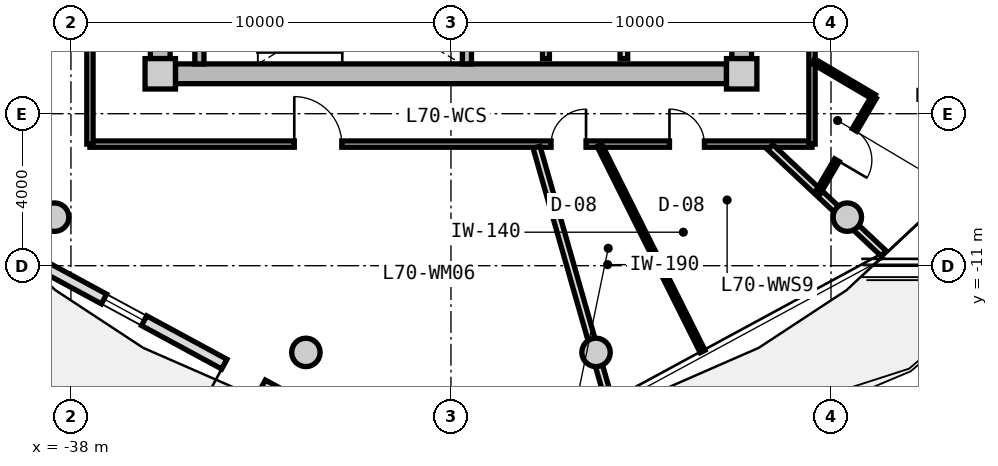
"""IFC4 building model, lengths in metres.
Left out: names, types, materials, properties, quantities, classifications, styles, units other than length and angle.
Written with IfcOpenShell. Run it as: python <this file> out.ifc"""

import sys

from ifc_helpers import new_model, si_unit, direction, frame, frame_2d, origin, origin_2d, place, context, subcontext, project, spatial, rectangle, circle, extrude, source, transform, mapped, element, fill, save


model = new_model("IFC4")
c1 = context("Model", 3, precision=1e-05, world=origin(), true_north=direction((0.0, 1.0)))
c2 = subcontext(c1, "Body", "Model", "MODEL_VIEW")
j1 = project(units=[si_unit("LENGTHUNIT", "METRE"), si_unit("PLANEANGLEUNIT", "RADIAN")], contexts=[c1])
p1 = place(None, origin())
s1 = spatial("IfcSite", under=j1, at=p1, CompositionType="ELEMENT")
p2 = place(p1, origin())
s2 = spatial("IfcBuilding", under=s1, at=p2, CompositionType="ELEMENT")
p3 = place(p2, frame((0.0, 0.0, 226.1)))
s3 = spatial("IfcBuildingStorey", under=s2, at=p3, CompositionType="ELEMENT", Elevation=226.1)
m1 = source(origin(), c2, "Body", "SweptSolid", [
    extrude(rectangle(XDim=0.8, YDim=0.8, at=origin_2d()), origin(), (0.0, 0.0, 1.0), 3.05),
])
for number, where, z_axis, x_axis in (
    (1, (-35.65, -5.95, 0.0), (0.0, 0.0, 1.0), (1.0, 0.0, 0.0)),
    (2, (-20.35, -5.95, 0.0), (0.0, 0.0, 1.0), (1.0, 0.0, 0.0)),
):
    element("IfcColumn", number, at=place(p3, frame(where, z_axis=z_axis, x_axis=x_axis)), inside=s3, PredefinedType="COLUMN", context=c2, shape_type="MappedRepresentation", body=[
        mapped(m1, transform((0.0, 0.0, 0.0), x_axis=(1.0, 0.0, 0.0), y_axis=(0.0, 1.0, 0.0), z_axis=(0.0, 0.0, 1.0), scale=1.0)),
    ])
m2 = source(origin(), c2, "Body", "SweptSolid", [
    extrude(rectangle(XDim=14.5, YDim=0.52, at=frame_2d((7.25, 0.0))), origin(), (0.0, 0.0, 1.0), 2.76),
])
p4 = place(p3, frame((-20.75, -5.95, 0.0), z_axis=(0.0, 0.0, 1.0), x_axis=(-1.0, 0.0, 0.0)))
e3 = element("IfcWall", 3, at=p4, inside=s3, PredefinedType="SHEAR", context=c2, shape_type="MappedRepresentation", body=[
    mapped(m2, transform((0.0, 0.0, 0.0), x_axis=(1.0, 0.0, 0.0), y_axis=(0.0, 1.0, 0.0), z_axis=(0.0, 0.0, 1.0), scale=1.0)),
])
m3 = source(origin(), c2, "Body", "SweptSolid", [
    extrude(rectangle(XDim=11.1, YDim=0.52, at=frame_2d((5.55, 0.0))), origin(), (0.0, 0.0, 1.0), 2.76),
])
p5 = place(p3, frame((-35.65, -5.55, 0.0), z_axis=(0.0, 0.0, 1.0), x_axis=(0.0, 1.0, 0.0)))
e4 = element("IfcWall", 4, at=p5, inside=s3, PredefinedType="SHEAR", context=c2, shape_type="MappedRepresentation", body=[
    mapped(m3, transform((0.0, 0.0, 0.0), x_axis=(1.0, 0.0, 0.0), y_axis=(0.0, 1.0, 0.0), z_axis=(0.0, 0.0, 1.0), scale=1.0)),
])
p6 = place(p5, frame((3.8, 0.0, 0.0)))
e5 = element("IfcOpeningElement", 5, at=p6, cuts=e4, PredefinedType="OPENING", context=c2, shape_type="SweptSolid", body=[
    extrude(rectangle(XDim=1.2, YDim=2.15, at=frame_2d((0.6, 1.075))), frame((0.0, 0.27, 0.0), z_axis=(0.0, -1.0, 0.0), x_axis=(1.0, 0.0, 0.0)), (0.0, 0.0, 1.0), 0.54),
])
p7 = place(p3, frame((-20.35, 5.55, 0.0), z_axis=(0.0, 0.0, 1.0), x_axis=(0.0, -1.0, 0.0)))
e6 = element("IfcWall", 6, at=p7, inside=s3, PredefinedType="SHEAR", context=c2, shape_type="MappedRepresentation", body=[
    mapped(m3, transform((0.0, 0.0, 0.0), x_axis=(1.0, 0.0, 0.0), y_axis=(0.0, 1.0, 0.0), z_axis=(0.0, 0.0, 1.0), scale=1.0)),
])
p8 = place(p7, frame((5.65, 0.0, 0.0)))
e7 = element("IfcOpeningElement", 7, at=p8, cuts=e6, PredefinedType="OPENING", context=c2, shape_type="SweptSolid", body=[
    extrude(rectangle(XDim=1.2, YDim=2.15, at=frame_2d((0.6, 1.075))), frame((0.0, 0.27, 0.0), z_axis=(0.0, -1.0, 0.0), x_axis=(1.0, 0.0, 0.0)), (0.0, 0.0, 1.0), 0.54),
])
p9 = place(p7, frame((9.3, 0.0, 0.0)))
e8 = element("IfcOpeningElement", 8, at=p9, cuts=e6, PredefinedType="OPENING", context=c2, shape_type="SweptSolid", body=[
    extrude(rectangle(XDim=1.0, YDim=2.1, at=frame_2d((0.5, 1.05))), frame((0.0, 0.27, 0.0), z_axis=(0.0, -1.0, 0.0), x_axis=(1.0, 0.0, 0.0)), (0.0, 0.0, 1.0), 0.54),
])
m4 = source(origin(), c2, "Body", "SweptSolid", [
    extrude(circle(Radius=0.375, at=origin_2d()), origin(), (0.0, 0.0, 1.0), 3.05),
])
for number, where, z_axis, x_axis in (
    (9, (-38.43, -9.723, 0.0), (0.0, 0.0, 1.0), (1.0, 0.0, 0.0)),
    (10, (-31.818, -13.281, 0.0), (0.0, 0.0, 1.0), (1.0, 0.0, 0.0)),
    (11, (-24.182, -13.281, 0.0), (0.0, 0.0, 1.0), (1.0, 0.0, 0.0)),
    (12, (-17.57, -9.723, 0.0), (0.0, 0.0, 1.0), (1.0, 0.0, 0.0)),
):
    element("IfcColumn", number, at=place(p3, frame(where, z_axis=z_axis, x_axis=x_axis)), inside=s3, PredefinedType="COLUMN", context=c2, shape_type="MappedRepresentation", body=[
        mapped(m4, transform((0.0, 0.0, 0.0), x_axis=(1.0, 0.0, 0.0), y_axis=(0.0, 1.0, 0.0), z_axis=(0.0, 0.0, 1.0), scale=1.0)),
    ])
m5 = source(origin(), c2, "Body", "SweptSolid", [
    extrude(rectangle(XDim=8.197, YDim=0.29, at=frame_2d((4.099, 0.0))), origin(), (0.0, 0.0, 1.0), 2.76),
])
p10 = place(p3, frame((-32.162, -14.566, 0.0), z_axis=(0.0, 0.0, 1.0), x_axis=(-0.879369910001, 0.476139224791, 0.0)))
e13 = element("IfcWall", 13, at=p10, inside=s3, PredefinedType="SOLIDWALL", context=c2, shape_type="MappedRepresentation", body=[
    mapped(m5, transform((0.0, 0.0, 0.0), x_axis=(1.0, 0.0, 0.0), y_axis=(0.0, 1.0, 0.0), z_axis=(0.0, 0.0, 1.0), scale=1.0)),
])
p11 = place(p10, frame((0.9, 0.0, 0.0)))
e14 = element("IfcOpeningElement", 14, at=p11, cuts=e13, PredefinedType="OPENING", context=c2, shape_type="SweptSolid", body=[
    extrude(rectangle(XDim=1.15, YDim=2.25, at=frame_2d((0.575, 1.125))), frame((0.0, 0.155, 0.0), z_axis=(0.0, -1.0, 0.0), x_axis=(1.0, 0.0, 0.0)), (0.0, 0.0, 1.0), 0.31),
])
p12 = place(p10, frame((4.448, 0.0, 0.85)))
e15 = element("IfcOpeningElement", 15, at=p12, cuts=e13, PredefinedType="OPENING", context=c2, shape_type="SweptSolid", body=[
    extrude(rectangle(XDim=1.2, YDim=1.5, at=frame_2d((0.6, 0.75))), frame((0.0, 0.155, 0.0), z_axis=(0.0, -1.0, 0.0), x_axis=(1.0, 0.0, 0.0)), (0.0, 0.0, 1.0), 0.31),
])
m6 = source(origin(), c2, "Body", "SweptSolid", [
    extrude(rectangle(XDim=3.24, YDim=0.24, at=frame_2d((1.62, 0.0))), origin(), (0.0, 0.0, 1.0), 2.76),
])
for number, where, z_axis, x_axis in (
    (16, (-34.62, -5.69, 0.0), (0.0, 0.0, 1.0), (0.0, 1.0, 0.0)),
    (17, (-27.58, -5.69, 0.0), (0.0, 0.0, 1.0), (0.0, 1.0, 0.0)),
):
    element("IfcWall", number, at=place(p3, frame(where, z_axis=z_axis, x_axis=x_axis)), inside=s3, PredefinedType="PARTITIONING", context=c2, shape_type="MappedRepresentation", body=[
        mapped(m6, transform((0.0, 0.0, 0.0), x_axis=(1.0, 0.0, 0.0), y_axis=(0.0, 1.0, 0.0), z_axis=(0.0, 0.0, 1.0), scale=1.0)),
    ])
m7 = source(origin(), c2, "Body", "SweptSolid", [
    extrude(rectangle(XDim=3.8, YDim=0.2, at=frame_2d((1.9, 0.0))), origin(), (0.0, 0.0, 1.0), 2.745),
])
p13 = place(p3, frame((-23.45, -5.55, 0.0), z_axis=(0.0, 0.0, 1.0), x_axis=(0.0, 1.0, 0.0)))
e18 = element("IfcWall", 18, at=p13, inside=s3, PredefinedType="PARTITIONING", context=c2, shape_type="MappedRepresentation", body=[
    mapped(m7, transform((0.0, 0.0, 0.0), x_axis=(1.0, 0.0, 0.0), y_axis=(0.0, 1.0, 0.0), z_axis=(0.0, 0.0, 1.0), scale=1.0)),
])
m8 = source(origin(), c2, "Body", "SweptSolid", [
    extrude(rectangle(XDim=4.2, YDim=0.18, at=frame_2d((2.1, 0.0))), origin(), (0.0, 0.0, 1.0), 2.745),
])
p14 = place(p3, frame((-25.5, -5.55, 0.0), z_axis=(0.0, 0.0, 1.0), x_axis=(0.0, 1.0, 0.0)))
e19 = element("IfcWall", 19, at=p14, inside=s3, PredefinedType="PARTITIONING", context=c2, shape_type="MappedRepresentation", body=[
    mapped(m8, transform((0.0, 0.0, 0.0), x_axis=(1.0, 0.0, 0.0), y_axis=(0.0, 1.0, 0.0), z_axis=(0.0, 0.0, 1.0), scale=1.0)),
])
m9 = source(origin(), c2, "Body", "SweptSolid", [
    extrude(rectangle(XDim=19.0, YDim=0.165, at=frame_2d((9.5, 0.0))), origin(), (0.0, 0.0, 1.0), 2.745),
])
p15 = place(p3, frame((-18.5, -7.8, 0.0), z_axis=(0.0, 0.0, 1.0), x_axis=(-1.0, 0.0, 0.0)))
e20 = element("IfcWall", 20, at=p15, inside=s3, PredefinedType="PARTITIONING", context=c2, shape_type="MappedRepresentation", body=[
    mapped(m9, transform((0.0, 0.0, 0.0), x_axis=(1.0, 0.0, 0.0), y_axis=(0.0, 1.0, 0.0), z_axis=(0.0, 0.0, 1.0), scale=1.0)),
])
p16 = place(p15, frame((12.373, 0.0, 0.0)))
e21 = element("IfcOpeningElement", 21, at=p16, cuts=e20, PredefinedType="OPENING", context=c2, shape_type="SweptSolid", body=[
    extrude(rectangle(XDim=1.25, YDim=2.2, at=frame_2d((0.625, 1.1))), frame((0.0, 0.093, 0.0), z_axis=(0.0, -1.0, 0.0), x_axis=(1.0, 0.0, 0.0)), (0.0, 0.0, 1.0), 0.185),
])
p17 = place(p15, frame((5.946, 0.0, 0.0)))
e22 = element("IfcOpeningElement", 22, at=p17, cuts=e20, PredefinedType="OPENING", context=c2, shape_type="SweptSolid", body=[
    extrude(rectangle(XDim=0.92, YDim=2.1, at=frame_2d((0.46, 1.05))), frame((0.0, 0.093, 0.0), z_axis=(0.0, -1.0, 0.0), x_axis=(1.0, 0.0, 0.0)), (0.0, 0.0, 1.0), 0.185),
])
p18 = place(p15, frame((2.83, 0.0, 0.0)))
e23 = element("IfcOpeningElement", 23, at=p18, cuts=e20, PredefinedType="OPENING", context=c2, shape_type="SweptSolid", body=[
    extrude(rectangle(XDim=0.92, YDim=2.1, at=frame_2d((0.46, 1.05))), frame((0.0, 0.093, 0.0), z_axis=(0.0, -1.0, 0.0), x_axis=(1.0, 0.0, 0.0)), (0.0, 0.0, 1.0), 0.185),
])
m10 = source(origin(), c2, "Body", "SweptSolid", [
    extrude(rectangle(XDim=6.88, YDim=0.165, at=frame_2d((3.44, 0.0))), origin(), (0.0, 0.0, 1.0), 2.745),
])
p19 = place(p3, frame((-37.5, -7.8, 0.0), z_axis=(0.0, 0.0, 1.0), x_axis=(0.0, 1.0, 0.0)))
e24 = element("IfcWall", 24, at=p19, inside=s3, PredefinedType="PARTITIONING", context=c2, shape_type="MappedRepresentation", body=[
    mapped(m10, transform((0.0, 0.0, 0.0), x_axis=(1.0, 0.0, 0.0), y_axis=(0.0, 1.0, 0.0), z_axis=(0.0, 0.0, 1.0), scale=1.0)),
])
p20 = place(p3, frame((-18.5, -0.92, 0.0), z_axis=(0.0, 0.0, 1.0), x_axis=(0.0, -1.0, 0.0)))
e25 = element("IfcWall", 25, at=p20, inside=s3, PredefinedType="PARTITIONING", context=c2, shape_type="MappedRepresentation", body=[
    mapped(m10, transform((0.0, 0.0, 0.0), x_axis=(1.0, 0.0, 0.0), y_axis=(0.0, 1.0, 0.0), z_axis=(0.0, 0.0, 1.0), scale=1.0)),
])
p21 = place(p20, frame((2.486, 0.0, 0.0)))
e26 = element("IfcOpeningElement", 26, at=p21, cuts=e25, PredefinedType="OPENING", context=c2, shape_type="SweptSolid", body=[
    extrude(rectangle(XDim=1.25, YDim=2.2, at=frame_2d((0.625, 1.1))), frame((0.0, 0.093, 0.0), z_axis=(0.0, -1.0, 0.0), x_axis=(1.0, 0.0, 0.0)), (0.0, 0.0, 1.0), 0.185),
])
m11 = source(origin(), c2, "Body", "SweptSolid", [
    extrude(rectangle(XDim=6.974, YDim=0.19, at=frame_2d((3.487, 0.0))), origin(), (0.0, 0.0, 1.0), 2.345),
])
p22 = place(p3, frame((-25.749, -7.88, 0.0), z_axis=(0.0, 0.0, 1.0), x_axis=(0.274707256801, -0.961527910703, 0.0)))
e27 = element("IfcWall", 27, at=p22, inside=s3, PredefinedType="PARTITIONING", context=c2, shape_type="MappedRepresentation", body=[
    mapped(m11, transform((0.0, 0.0, 0.0), x_axis=(1.0, 0.0, 0.0), y_axis=(0.0, 1.0, 0.0), z_axis=(0.0, 0.0, 1.0), scale=1.0)),
])
m12 = source(origin(), c2, "Body", "SweptSolid", [
    extrude(rectangle(XDim=4.089, YDim=0.19, at=frame_2d((2.044, 0.0))), origin(), (0.0, 0.0, 1.0), 2.345),
])
p23 = place(p3, frame((-19.598, -7.88, 0.0), z_axis=(0.0, 0.0, 1.0), x_axis=(0.729401273609, -0.684086092577, 0.0)))
e28 = element("IfcWall", 28, at=p23, inside=s3, PredefinedType="PARTITIONING", context=c2, shape_type="MappedRepresentation", body=[
    mapped(m12, transform((0.0, 0.0, 0.0), x_axis=(1.0, 0.0, 0.0), y_axis=(0.0, 1.0, 0.0), z_axis=(0.0, 0.0, 1.0), scale=1.0)),
])
m13 = source(origin(), c2, "Body", "SweptSolid", [
    extrude(rectangle(XDim=6.067, YDim=0.14, at=frame_2d((3.034, 0.0))), origin(), (0.0, 0.0, 1.0), 2.745),
])
p24 = place(p3, frame((-24.093, -7.83, 0.0), z_axis=(0.0, 0.0, 1.0), x_axis=(0.447261882231, -0.894403046005, 0.0)))
e29 = element("IfcWall", 29, at=p24, inside=s3, PredefinedType="PARTITIONING", context=c2, shape_type="MappedRepresentation", body=[
    mapped(m13, transform((0.0, 0.0, 0.0), x_axis=(1.0, 0.0, 0.0), y_axis=(0.0, 1.0, 0.0), z_axis=(0.0, 0.0, 1.0), scale=1.0)),
])
m14 = source(origin(), c2, "Body", "SweptSolid", [
    extrude(rectangle(XDim=1.859, YDim=0.14, at=frame_2d((0.93, 0.0))), origin(), (0.0, 0.0, 1.0), 2.745),
])
p25 = place(p3, frame((-18.47, -5.615, 0.0), z_axis=(0.0, 0.0, 1.0), x_axis=(0.861555897139, -0.507662718845, 0.0)))
e30 = element("IfcWall", 30, at=p25, inside=s3, PredefinedType="PARTITIONING", context=c2, shape_type="MappedRepresentation", body=[
    mapped(m14, transform((0.0, 0.0, 0.0), x_axis=(1.0, 0.0, 0.0), y_axis=(0.0, 1.0, 0.0), z_axis=(0.0, 0.0, 1.0), scale=1.0)),
])
m15 = source(origin(), c2, "Body", "SweptSolid", [
    extrude(rectangle(XDim=2.939, YDim=0.14, at=frame_2d((1.47, 0.0))), origin(), (0.0, 0.0, 1.0), 2.745),
])
p26 = place(p3, frame((-16.868, -6.559, 0.0), z_axis=(0.0, 0.0, 1.0), x_axis=(-0.505883614636, -0.862601743821, 0.0)))
e31 = element("IfcWall", 31, at=p26, inside=s3, PredefinedType="PARTITIONING", context=c2, shape_type="MappedRepresentation", body=[
    mapped(m15, transform((0.0, 0.0, 0.0), x_axis=(1.0, 0.0, 0.0), y_axis=(0.0, 1.0, 0.0), z_axis=(0.0, 0.0, 1.0), scale=1.0)),
])
p27 = place(p26, frame((1.01, 0.0, 0.0)))
e32 = element("IfcOpeningElement", 32, at=p27, cuts=e31, PredefinedType="OPENING", context=c2, shape_type="SweptSolid", body=[
    extrude(rectangle(XDim=0.92, YDim=2.1, at=frame_2d((0.46, 1.05))), frame((0.0, 0.08, 0.0), z_axis=(0.0, -1.0, 0.0), x_axis=(1.0, 0.0, 0.0)), (0.0, 0.0, 1.0), 0.16),
])
m16 = source(origin(), c2, "Body", "SweptSolid", [
    extrude(rectangle(XDim=1.15, YDim=2.25, at=frame_2d((0.575, 1.125))), frame((0.0, 0.025, 0.0), z_axis=(0.0, -1.0, 0.0), x_axis=(1.0, 0.0, 0.0)), (0.0, 0.0, 1.0), 0.05),
])
p28 = place(p11, origin())
e33 = element("IfcDoor", 33, at=p28, inside=s3, OperationType="SINGLE_SWING_RIGHT", PredefinedType="DOOR", context=c2, shape_type="MappedRepresentation", body=[
    mapped(m16, transform((0.0, 0.0, 0.0), x_axis=(1.0, 0.0, 0.0), y_axis=(0.0, 1.0, 0.0), z_axis=(0.0, 0.0, 1.0), scale=1.0)),
])
fill(e14, e33)
m17 = source(origin(), c2, "Body", "SweptSolid", [
    extrude(rectangle(XDim=1.2, YDim=1.5, at=frame_2d((0.6, 0.75))), frame((0.0, 0.03, 0.0), z_axis=(0.0, -1.0, 0.0), x_axis=(1.0, 0.0, 0.0)), (0.0, 0.0, 1.0), 0.06),
])
p29 = place(p12, origin())
e34 = element("IfcWindow", 34, at=p29, inside=s3, PartitioningType="SINGLE_PANEL", PredefinedType="WINDOW", context=c2, shape_type="MappedRepresentation", body=[
    mapped(m17, transform((0.0, 0.0, 0.0), x_axis=(1.0, 0.0, 0.0), y_axis=(0.0, 1.0, 0.0), z_axis=(0.0, 0.0, 1.0), scale=1.0)),
])
fill(e15, e34)
m18 = source(origin(), c2, "Body", "SweptSolid", [
    extrude(rectangle(XDim=1.25, YDim=2.2, at=frame_2d((0.625, 1.1))), frame((0.0, 0.025, 0.0), z_axis=(0.0, -1.0, 0.0), x_axis=(1.0, 0.0, 0.0)), (0.0, 0.0, 1.0), 0.05),
])
p30 = place(p16, frame((1.25, 0.0, 0.0), z_axis=(0.0, 0.0, 1.0), x_axis=(-1.0, 0.0, 0.0)))
e35 = element("IfcDoor", 35, at=p30, inside=s3, OperationType="SINGLE_SWING_LEFT", PredefinedType="DOOR", context=c2, shape_type="MappedRepresentation", body=[
    mapped(m18, transform((0.0, 0.0, 0.0), x_axis=(1.0, 0.0, 0.0), y_axis=(0.0, 1.0, 0.0), z_axis=(0.0, 0.0, 1.0), scale=1.0)),
])
fill(e21, e35)
m19 = source(origin(), c2, "Body", "SweptSolid", [
    extrude(rectangle(XDim=0.92, YDim=2.1, at=frame_2d((0.46, 1.05))), frame((0.0, 0.025, 0.0), z_axis=(0.0, -1.0, 0.0), x_axis=(1.0, 0.0, 0.0)), (0.0, 0.0, 1.0), 0.05),
])
p31 = place(p17, frame((0.92, 0.0, 0.0), z_axis=(0.0, 0.0, 1.0), x_axis=(-1.0, 0.0, 0.0)))
e36 = element("IfcDoor", 36, at=p31, inside=s3, OperationType="SINGLE_SWING_RIGHT", PredefinedType="DOOR", context=c2, shape_type="MappedRepresentation", body=[
    mapped(m19, transform((0.0, 0.0, 0.0), x_axis=(1.0, 0.0, 0.0), y_axis=(0.0, 1.0, 0.0), z_axis=(0.0, 0.0, 1.0), scale=1.0)),
])
fill(e22, e36)
p32 = place(p18, frame((0.92, 0.0, 0.0), z_axis=(0.0, 0.0, 1.0), x_axis=(-1.0, 0.0, 0.0)))
e37 = element("IfcDoor", 37, at=p32, inside=s3, OperationType="SINGLE_SWING_LEFT", PredefinedType="DOOR", context=c2, shape_type="MappedRepresentation", body=[
    mapped(m19, transform((0.0, 0.0, 0.0), x_axis=(1.0, 0.0, 0.0), y_axis=(0.0, 1.0, 0.0), z_axis=(0.0, 0.0, 1.0), scale=1.0)),
])
fill(e23, e37)
p33 = place(p27, origin())
e38 = element("IfcDoor", 38, at=p33, inside=s3, OperationType="SINGLE_SWING_RIGHT", PredefinedType="DOOR", context=c2, shape_type="MappedRepresentation", body=[
    mapped(m19, transform((0.0, 0.0, 0.0), x_axis=(1.0, 0.0, 0.0), y_axis=(0.0, 1.0, 0.0), z_axis=(0.0, 0.0, 1.0), scale=1.0)),
])
fill(e32, e38)
save(model, sys.argv[1])
